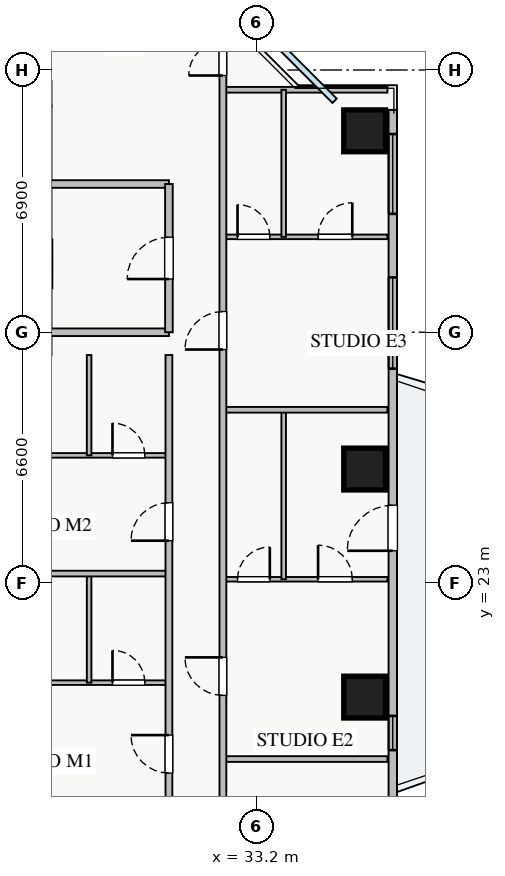
"""IFC4 building model, lengths in metres.
Left out: names, types, materials, properties, quantities, classifications, styles, units other than length and angle.
Written with IfcOpenShell. Run it as: python <this file> out.ifc"""

import sys

from ifc_helpers import new_model, si_unit, direction, frame, frame_2d, origin, origin_2d, place, context, subcontext, project, spatial, rectangle, extrude, source, transform, mapped, element, fill, save


model = new_model("IFC4")
c1 = context("Model", 3, precision=1e-05, world=origin(), true_north=direction((0.0, 1.0)))
c2 = subcontext(c1, "Body", "Model", "MODEL_VIEW")
j1 = project(units=[si_unit("LENGTHUNIT", "METRE"), si_unit("PLANEANGLEUNIT", "RADIAN")], contexts=[c1])
p1 = place(None, origin())
s1 = spatial("IfcSite", under=j1, at=p1, CompositionType="ELEMENT")
p2 = place(p1, origin())
s2 = spatial("IfcBuilding", under=s1, at=p2, CompositionType="ELEMENT")
p3 = place(p2, frame((0.0, 0.0, 110.0)))
s3 = spatial("IfcBuildingStorey", under=s2, at=p3, CompositionType="ELEMENT", Elevation=110.0)
m1 = source(origin(), c2, "Body", "SweptSolid", [
    extrude(rectangle(XDim=1.1, YDim=1.1, at=origin_2d()), origin(), (0.0, 0.0, 1.0), 3.25),
])
for number, where, z_axis, x_axis in (
    (1, (36.05, 20.0, 0.0), (0.0, 0.0, 1.0), (1.0, 0.0, 0.0)),
    (2, (36.05, 26.0, 0.0), (0.0, 0.0, 1.0), (1.0, 0.0, 0.0)),
    (3, (36.05, 34.9, 0.0), (0.0, 0.0, 1.0), (1.0, 0.0, 0.0)),
):
    element("IfcColumn", number, at=place(p3, frame(where, z_axis=z_axis, x_axis=x_axis)), inside=s3, PredefinedType="COLUMN", context=c2, shape_type="MappedRepresentation", body=[
        mapped(m1, transform((0.0, 0.0, 0.0), x_axis=(1.0, 0.0, 0.0), y_axis=(0.0, 1.0, 0.0), z_axis=(0.0, 0.0, 1.0), scale=1.0)),
    ])
p4 = place(p3, frame((36.79, 10.55, 0.0), z_axis=(0.0, 0.0, 1.0), x_axis=(0.0, 1.0, 0.0)))
e4 = element("IfcWall", 4, at=p4, inside=s3, PredefinedType="STANDARD", context=c2, shape_type="SweptSolid", body=[
    extrude(rectangle(XDim=24.9, YDim=0.22, at=frame_2d((12.45, 0.0))), origin(), (0.0, 0.0, 1.0), 2.61),
])
p5 = place(p4, frame((13.3, 0.0, 0.0)))
e5 = element("IfcOpeningElement", 5, at=p5, cuts=e4, PredefinedType="OPENING", context=c2, shape_type="SweptSolid", body=[
    extrude(rectangle(XDim=1.2, YDim=2.1, at=frame_2d((0.6, 1.05))), frame((0.0, 0.12, 0.0), z_axis=(0.0, -1.0, 0.0), x_axis=(1.0, 0.0, 0.0)), (0.0, 0.0, 1.0), 0.24),
])
p6 = place(p4, frame((1.912, 0.0, 0.9)))
e6 = element("IfcOpeningElement", 6, at=p6, cuts=e4, PredefinedType="OPENING", context=c2, shape_type="SweptSolid", body=[
    extrude(rectangle(XDim=2.4, YDim=1.48, at=frame_2d((1.2, 0.74))), frame((0.0, 0.12, 0.0), z_axis=(0.0, -1.0, 0.0), x_axis=(1.0, 0.0, 0.0)), (0.0, 0.0, 1.0), 0.24),
])
p7 = place(p4, frame((22.165, 0.0, 0.9)))
e7 = element("IfcOpeningElement", 7, at=p7, cuts=e4, PredefinedType="OPENING", context=c2, shape_type="SweptSolid", body=[
    extrude(rectangle(XDim=2.1, YDim=1.5, at=frame_2d((1.05, 0.75))), frame((0.0, 0.12, 0.0), z_axis=(0.0, -1.0, 0.0), x_axis=(1.0, 0.0, 0.0)), (0.0, 0.0, 1.0), 0.24),
])
p8 = place(p4, frame((18.093, 0.0, 0.9)))
e8 = element("IfcOpeningElement", 8, at=p8, cuts=e4, PredefinedType="OPENING", context=c2, shape_type="SweptSolid", body=[
    extrude(rectangle(XDim=2.4, YDim=1.5, at=frame_2d((1.2, 0.75))), frame((0.0, 0.12, 0.0), z_axis=(0.0, -1.0, 0.0), x_axis=(1.0, 0.0, 0.0)), (0.0, 0.0, 1.0), 0.24),
])
p9 = place(p4, frame((8.055, 0.0, 0.9)))
e9 = element("IfcOpeningElement", 9, at=p9, cuts=e4, PredefinedType="OPENING", context=c2, shape_type="SweptSolid", body=[
    extrude(rectangle(XDim=0.9, YDim=1.2, at=frame_2d((0.45, 0.6))), frame((0.0, 0.12, 0.0), z_axis=(0.0, -1.0, 0.0), x_axis=(1.0, 0.0, 0.0)), (0.0, 0.0, 1.0), 0.24),
])
for number, where, z_axis, x_axis in (
    (10, (27.8, 29.6, 0.0), (0.0, 0.0, 1.0), (1.0, 0.0, 0.0)),
    (11, (27.8, 33.5, 0.0), (0.0, 0.0, 1.0), (1.0, 0.0, 0.0)),
):
    element("IfcWall", number, at=place(p3, frame(where, z_axis=z_axis, x_axis=x_axis)), inside=s3, PredefinedType="PARTITIONING", context=c2, shape_type="SweptSolid", body=[
        extrude(rectangle(XDim=3.1, YDim=0.2, at=frame_2d((1.55, 0.0))), origin(), (0.0, 0.0, 1.0), 3.07),
    ])
p10 = place(p3, frame((30.9, 29.6, 0.0), z_axis=(0.0, 0.0, 1.0), x_axis=(0.0, 1.0, 0.0)))
e12 = element("IfcWall", 12, at=p10, inside=s3, PredefinedType="PARTITIONING", context=c2, shape_type="SweptSolid", body=[
    extrude(rectangle(XDim=3.9, YDim=0.2, at=frame_2d((1.95, 0.0))), origin(), (0.0, 0.0, 1.0), 3.07),
])
p11 = place(p10, frame((1.4, 0.0, 0.0)))
e13 = element("IfcOpeningElement", 13, at=p11, cuts=e12, PredefinedType="OPENING", context=c2, shape_type="SweptSolid", body=[
    extrude(rectangle(XDim=1.1, YDim=2.05, at=frame_2d((0.55, 1.025))), frame((0.0, 0.11, 0.0), z_axis=(0.0, -1.0, 0.0), x_axis=(1.0, 0.0, 0.0)), (0.0, 0.0, 1.0), 0.22),
])
p12 = place(p3, frame((32.32, 35.98, 0.0), z_axis=(0.0, 0.0, 1.0), x_axis=(1.0, 0.0, 0.0)))
e14 = element("IfcWall", 14, at=p12, inside=s3, PredefinedType="PARTITIONING", context=c2, shape_type="SweptSolid", body=[
    extrude(rectangle(XDim=4.33, YDim=0.15, at=frame_2d((2.165, 0.0))), origin(), (0.0, 0.0, 1.0), 3.07),
])
p13 = place(p3, frame((32.32, 23.1, 0.0), z_axis=(0.0, 0.0, 1.0), x_axis=(1.0, 0.0, 0.0)))
e15 = element("IfcWall", 15, at=p13, inside=s3, PredefinedType="PLUMBINGWALL", context=c2, shape_type="SweptSolid", body=[
    extrude(rectangle(XDim=4.33, YDim=0.12, at=frame_2d((2.165, 0.0))), origin(), (0.0, 0.0, 1.0), 3.07),
])
p14 = place(p13, frame((0.385, 0.0, 0.0)))
e16 = element("IfcOpeningElement", 16, at=p14, cuts=e15, PredefinedType="OPENING", context=c2, shape_type="SweptSolid", body=[
    extrude(rectangle(XDim=0.85, YDim=2.05, at=frame_2d((0.425, 1.025))), frame((0.0, 0.07, 0.0), z_axis=(0.0, -1.0, 0.0), x_axis=(1.0, 0.0, 0.0)), (0.0, 0.0, 1.0), 0.14),
])
p15 = place(p13, frame((2.505, 0.0, 0.0)))
e17 = element("IfcOpeningElement", 17, at=p15, cuts=e15, PredefinedType="OPENING", context=c2, shape_type="SweptSolid", body=[
    extrude(rectangle(XDim=0.9, YDim=2.05, at=frame_2d((0.45, 1.025))), frame((0.0, 0.07, 0.0), z_axis=(0.0, -1.0, 0.0), x_axis=(1.0, 0.0, 0.0)), (0.0, 0.0, 1.0), 0.14),
])
p16 = place(p3, frame((33.92, 23.1, 0.0), z_axis=(0.0, 0.0, 1.0), x_axis=(0.0, 1.0, 0.0)))
e18 = element("IfcWall", 18, at=p16, inside=s3, PredefinedType="PLUMBINGWALL", context=c2, shape_type="SweptSolid", body=[
    extrude(rectangle(XDim=4.46, YDim=0.12, at=frame_2d((2.23, 0.0))), origin(), (0.0, 0.0, 1.0), 3.07),
])
p17 = place(p3, frame((32.32, 18.37, 0.0), z_axis=(0.0, 0.0, 1.0), x_axis=(1.0, 0.0, 0.0)))
e19 = element("IfcWall", 19, at=p17, inside=s3, PredefinedType="PARTITIONING", context=c2, shape_type="SweptSolid", body=[
    extrude(rectangle(XDim=4.33, YDim=0.15, at=frame_2d((2.165, 0.0))), origin(), (0.0, 0.0, 1.0), 2.821),
])
p18 = place(p3, frame((32.32, 32.11, 0.0), z_axis=(0.0, 0.0, 1.0), x_axis=(1.0, 0.0, 0.0)))
e20 = element("IfcWall", 20, at=p18, inside=s3, PredefinedType="PLUMBINGWALL", context=c2, shape_type="SweptSolid", body=[
    extrude(rectangle(XDim=4.33, YDim=0.12, at=frame_2d((2.165, 0.0))), origin(), (0.0, 0.0, 1.0), 3.07),
])
p19 = place(p18, frame((0.385, 0.0, 0.0)))
e21 = element("IfcOpeningElement", 21, at=p19, cuts=e20, PredefinedType="OPENING", context=c2, shape_type="SweptSolid", body=[
    extrude(rectangle(XDim=0.85, YDim=2.05, at=frame_2d((0.425, 1.025))), frame((0.0, 0.07, 0.0), z_axis=(0.0, -1.0, 0.0), x_axis=(1.0, 0.0, 0.0)), (0.0, 0.0, 1.0), 0.14),
])
p20 = place(p18, frame((2.505, 0.0, 0.0)))
e22 = element("IfcOpeningElement", 22, at=p20, cuts=e20, PredefinedType="OPENING", context=c2, shape_type="SweptSolid", body=[
    extrude(rectangle(XDim=0.9, YDim=2.05, at=frame_2d((0.45, 1.025))), frame((0.0, 0.07, 0.0), z_axis=(0.0, -1.0, 0.0), x_axis=(1.0, 0.0, 0.0)), (0.0, 0.0, 1.0), 0.14),
])
p21 = place(p3, frame((33.92, 32.11, 0.0), z_axis=(0.0, 0.0, 1.0), x_axis=(0.0, 1.0, 0.0)))
e23 = element("IfcWall", 23, at=p21, inside=s3, PredefinedType="PLUMBINGWALL", context=c2, shape_type="SweptSolid", body=[
    extrude(rectangle(XDim=3.87, YDim=0.12, at=frame_2d((1.935, 0.0))), origin(), (0.0, 0.0, 1.0), 3.07),
])
p22 = place(p3, frame((32.32, 27.56, 0.0), z_axis=(0.0, 0.0, 1.0), x_axis=(1.0, 0.0, 0.0)))
e24 = element("IfcWall", 24, at=p22, inside=s3, PredefinedType="PARTITIONING", context=c2, shape_type="SweptSolid", body=[
    extrude(rectangle(XDim=4.33, YDim=0.15, at=frame_2d((2.165, 0.0))), origin(), (0.0, 0.0, 1.0), 3.07),
])
p23 = place(p3, frame((32.32, 8.31, 0.0), z_axis=(0.0, 0.0, 1.0), x_axis=(0.0, 1.0, 0.0)))
e25 = element("IfcWall", 25, at=p23, inside=s3, PredefinedType="PARTITIONING", context=c2, shape_type="SweptSolid", body=[
    extrude(rectangle(XDim=29.34, YDim=0.18, at=frame_2d((14.67, 0.0))), origin(), (0.0, 0.0, 1.0), 3.07),
])
p24 = place(p23, frame((28.045, 0.0, 0.0)))
e26 = element("IfcOpeningElement", 26, at=p24, cuts=e25, PredefinedType="OPENING", context=c2, shape_type="SweptSolid", body=[
    extrude(rectangle(XDim=0.9, YDim=2.05, at=frame_2d((0.45, 1.025))), frame((0.0, 0.1, 0.0), z_axis=(0.0, -1.0, 0.0), x_axis=(1.0, 0.0, 0.0)), (0.0, 0.0, 1.0), 0.2),
])
p25 = place(p23, frame((0.415, 0.0, 0.0)))
e27 = element("IfcOpeningElement", 27, at=p25, cuts=e25, PredefinedType="OPENING", context=c2, shape_type="SweptSolid", body=[
    extrude(rectangle(XDim=0.9, YDim=2.05, at=frame_2d((0.45, 1.025))), frame((0.0, 0.1, 0.0), z_axis=(0.0, -1.0, 0.0), x_axis=(1.0, 0.0, 0.0)), (0.0, 0.0, 1.0), 0.2),
])
p26 = place(p23, frame((5.385, 0.0, 0.0)))
e28 = element("IfcOpeningElement", 28, at=p26, cuts=e25, PredefinedType="OPENING", context=c2, shape_type="SweptSolid", body=[
    extrude(rectangle(XDim=1.0, YDim=2.05, at=frame_2d((0.5, 1.025))), frame((0.0, 0.1, 0.0), z_axis=(0.0, -1.0, 0.0), x_axis=(1.0, 0.0, 0.0)), (0.0, 0.0, 1.0), 0.2),
])
p27 = place(p23, frame((11.735, 0.0, 0.0)))
e29 = element("IfcOpeningElement", 29, at=p27, cuts=e25, PredefinedType="OPENING", context=c2, shape_type="SweptSolid", body=[
    extrude(rectangle(XDim=1.0, YDim=2.05, at=frame_2d((0.5, 1.025))), frame((0.0, 0.1, 0.0), z_axis=(0.0, -1.0, 0.0), x_axis=(1.0, 0.0, 0.0)), (0.0, 0.0, 1.0), 0.2),
])
p28 = place(p23, frame((20.835, 0.0, 0.0)))
e30 = element("IfcOpeningElement", 30, at=p28, cuts=e25, PredefinedType="OPENING", context=c2, shape_type="SweptSolid", body=[
    extrude(rectangle(XDim=1.0, YDim=2.05, at=frame_2d((0.5, 1.025))), frame((0.0, 0.1, 0.0), z_axis=(0.0, -1.0, 0.0), x_axis=(1.0, 0.0, 0.0)), (0.0, 0.0, 1.0), 0.2),
])
p29 = place(p3, frame((25.22, 20.38, 0.0), z_axis=(0.0, 0.0, 1.0), x_axis=(1.0, 0.0, 0.0)))
e31 = element("IfcWall", 31, at=p29, inside=s3, PredefinedType="PLUMBINGWALL", context=c2, shape_type="SweptSolid", body=[
    extrude(rectangle(XDim=5.68, YDim=0.12, at=frame_2d((2.84, 0.0))), origin(), (0.0, 0.0, 1.0), 3.07),
])
p30 = place(p29, frame((1.35, 0.0, 0.0)))
e32 = element("IfcOpeningElement", 32, at=p30, cuts=e31, PredefinedType="OPENING", context=c2, shape_type="SweptSolid", body=[
    extrude(rectangle(XDim=0.9, YDim=2.05, at=frame_2d((0.45, 1.025))), frame((0.0, 0.07, 0.0), z_axis=(0.0, -1.0, 0.0), x_axis=(1.0, 0.0, 0.0)), (0.0, 0.0, 1.0), 0.14),
])
p31 = place(p29, frame((4.195, 0.0, 0.0)))
e33 = element("IfcOpeningElement", 33, at=p31, cuts=e31, PredefinedType="OPENING", context=c2, shape_type="SweptSolid", body=[
    extrude(rectangle(XDim=0.85, YDim=2.05, at=frame_2d((0.425, 1.025))), frame((0.0, 0.07, 0.0), z_axis=(0.0, -1.0, 0.0), x_axis=(1.0, 0.0, 0.0)), (0.0, 0.0, 1.0), 0.14),
])
p32 = place(p3, frame((28.8, 20.38, 0.0), z_axis=(0.0, 0.0, 1.0), x_axis=(0.0, 1.0, 0.0)))
e34 = element("IfcWall", 34, at=p32, inside=s3, PredefinedType="PLUMBINGWALL", context=c2, shape_type="SweptSolid", body=[
    extrude(rectangle(XDim=2.87, YDim=0.12, at=frame_2d((1.435, 0.0))), origin(), (0.0, 0.0, 1.0), 3.07),
])
p33 = place(p3, frame((25.22, 26.36, 0.0), z_axis=(0.0, 0.0, 1.0), x_axis=(1.0, 0.0, 0.0)))
e35 = element("IfcWall", 35, at=p33, inside=s3, PredefinedType="PLUMBINGWALL", context=c2, shape_type="SweptSolid", body=[
    extrude(rectangle(XDim=5.68, YDim=0.12, at=frame_2d((2.84, 0.0))), origin(), (0.0, 0.0, 1.0), 3.07),
])
p34 = place(p33, frame((1.35, 0.0, 0.0)))
e36 = element("IfcOpeningElement", 36, at=p34, cuts=e35, PredefinedType="OPENING", context=c2, shape_type="SweptSolid", body=[
    extrude(rectangle(XDim=0.9, YDim=2.05, at=frame_2d((0.45, 1.025))), frame((0.0, 0.07, 0.0), z_axis=(0.0, -1.0, 0.0), x_axis=(1.0, 0.0, 0.0)), (0.0, 0.0, 1.0), 0.14),
])
p35 = place(p33, frame((4.195, 0.0, 0.0)))
e37 = element("IfcOpeningElement", 37, at=p35, cuts=e35, PredefinedType="OPENING", context=c2, shape_type="SweptSolid", body=[
    extrude(rectangle(XDim=0.85, YDim=2.05, at=frame_2d((0.425, 1.025))), frame((0.0, 0.07, 0.0), z_axis=(0.0, -1.0, 0.0), x_axis=(1.0, 0.0, 0.0)), (0.0, 0.0, 1.0), 0.14),
])
p36 = place(p3, frame((28.8, 26.36, 0.0), z_axis=(0.0, 0.0, 1.0), x_axis=(0.0, 1.0, 0.0)))
e38 = element("IfcWall", 38, at=p36, inside=s3, PredefinedType="PLUMBINGWALL", context=c2, shape_type="SweptSolid", body=[
    extrude(rectangle(XDim=2.64, YDim=0.12, at=frame_2d((1.32, 0.0))), origin(), (0.0, 0.0, 1.0), 3.07),
])
p37 = place(p3, frame((25.22, 23.25, 0.0), z_axis=(0.0, 0.0, 1.0), x_axis=(1.0, 0.0, 0.0)))
e39 = element("IfcWall", 39, at=p37, inside=s3, PredefinedType="PARTITIONING", context=c2, shape_type="SweptSolid", body=[
    extrude(rectangle(XDim=5.68, YDim=0.15, at=frame_2d((2.84, 0.0))), origin(), (0.0, 0.0, 1.0), 3.07),
])
p38 = place(p3, frame((30.9, 17.0, 0.0), z_axis=(0.0, 0.0, 1.0), x_axis=(0.0, 1.0, 0.0)))
e40 = element("IfcWall", 40, at=p38, inside=s3, PredefinedType="PARTITIONING", context=c2, shape_type="SweptSolid", body=[
    extrude(rectangle(XDim=12.0, YDim=0.18, at=frame_2d((6.0, 0.0))), origin(), (0.0, 0.0, 1.0), 3.07),
])
p39 = place(p38, frame((1.0, 0.0, 0.0)))
e41 = element("IfcOpeningElement", 41, at=p39, cuts=e40, PredefinedType="OPENING", context=c2, shape_type="SweptSolid", body=[
    extrude(rectangle(XDim=1.0, YDim=2.05, at=frame_2d((0.5, 1.025))), frame((0.0, 0.1, 0.0), z_axis=(0.0, -1.0, 0.0), x_axis=(1.0, 0.0, 0.0)), (0.0, 0.0, 1.0), 0.2),
])
p40 = place(p38, frame((7.115, 0.0, 0.0)))
e42 = element("IfcOpeningElement", 42, at=p40, cuts=e40, PredefinedType="OPENING", context=c2, shape_type="SweptSolid", body=[
    extrude(rectangle(XDim=1.0, YDim=2.05, at=frame_2d((0.5, 1.025))), frame((0.0, 0.1, 0.0), z_axis=(0.0, -1.0, 0.0), x_axis=(1.0, 0.0, 0.0)), (0.0, 0.0, 1.0), 0.2),
])
m2 = source(origin(), c2, "Body", "SweptSolid", [
    extrude(rectangle(XDim=1.2, YDim=2.1, at=frame_2d((0.6, 1.05))), frame((0.0, 0.025, 0.0), z_axis=(0.0, -1.0, 0.0), x_axis=(1.0, 0.0, 0.0)), (0.0, 0.0, 1.0), 0.05),
])
p41 = place(p5, origin())
e43 = element("IfcDoor", 43, at=p41, inside=s3, OperationType="SINGLE_SWING_LEFT", PredefinedType="DOOR", context=c2, shape_type="MappedRepresentation", body=[
    mapped(m2, transform((0.0, 0.0, 0.0), x_axis=(1.0, 0.0, 0.0), y_axis=(0.0, 1.0, 0.0), z_axis=(0.0, 0.0, 1.0), scale=1.0)),
])
fill(e5, e43)
m3 = source(origin(), c2, "Body", "SweptSolid", [
    extrude(rectangle(XDim=2.1, YDim=1.5, at=frame_2d((1.05, 0.75))), frame((0.0, 0.03, 0.0), z_axis=(0.0, -1.0, 0.0), x_axis=(1.0, 0.0, 0.0)), (0.0, 0.0, 1.0), 0.06),
])
p42 = place(p7, origin())
e44 = element("IfcWindow", 44, at=p42, inside=s3, PartitioningType="TRIPLE_PANEL_VERTICAL", PredefinedType="WINDOW", context=c2, shape_type="MappedRepresentation", body=[
    mapped(m3, transform((0.0, 0.0, 0.0), x_axis=(1.0, 0.0, 0.0), y_axis=(0.0, 1.0, 0.0), z_axis=(0.0, 0.0, 1.0), scale=1.0)),
])
fill(e7, e44)
m4 = source(origin(), c2, "Body", "SweptSolid", [
    extrude(rectangle(XDim=1.1, YDim=2.05, at=frame_2d((0.55, 1.025))), frame((0.0, 0.025, 0.0), z_axis=(0.0, -1.0, 0.0), x_axis=(1.0, 0.0, 0.0)), (0.0, 0.0, 1.0), 0.05),
])
p43 = place(p11, origin())
e45 = element("IfcDoor", 45, at=p43, inside=s3, OperationType="SINGLE_SWING_LEFT", PredefinedType="DOOR", context=c2, shape_type="MappedRepresentation", body=[
    mapped(m4, transform((0.0, 0.0, 0.0), x_axis=(1.0, 0.0, 0.0), y_axis=(0.0, 1.0, 0.0), z_axis=(0.0, 0.0, 1.0), scale=1.0)),
])
fill(e13, e45)
m5 = source(origin(), c2, "Body", "SweptSolid", [
    extrude(rectangle(XDim=0.85, YDim=2.05, at=frame_2d((0.425, 1.025))), frame((0.0, 0.025, 0.0), z_axis=(0.0, -1.0, 0.0), x_axis=(1.0, 0.0, 0.0)), (0.0, 0.0, 1.0), 0.05),
])
p44 = place(p14, origin())
e46 = element("IfcDoor", 46, at=p44, inside=s3, OperationType="SINGLE_SWING_RIGHT", PredefinedType="DOOR", context=c2, shape_type="MappedRepresentation", body=[
    mapped(m5, transform((0.0, 0.0, 0.0), x_axis=(1.0, 0.0, 0.0), y_axis=(0.0, 1.0, 0.0), z_axis=(0.0, 0.0, 1.0), scale=1.0)),
])
fill(e16, e46)
m6 = source(origin(), c2, "Body", "SweptSolid", [
    extrude(rectangle(XDim=0.9, YDim=2.05, at=frame_2d((0.45, 1.025))), frame((0.0, 0.025, 0.0), z_axis=(0.0, -1.0, 0.0), x_axis=(1.0, 0.0, 0.0)), (0.0, 0.0, 1.0), 0.05),
])
p45 = place(p15, origin())
e47 = element("IfcDoor", 47, at=p45, inside=s3, OperationType="SINGLE_SWING_LEFT", PredefinedType="DOOR", context=c2, shape_type="MappedRepresentation", body=[
    mapped(m6, transform((0.0, 0.0, 0.0), x_axis=(1.0, 0.0, 0.0), y_axis=(0.0, 1.0, 0.0), z_axis=(0.0, 0.0, 1.0), scale=1.0)),
])
fill(e17, e47)
p46 = place(p19, origin())
e48 = element("IfcDoor", 48, at=p46, inside=s3, OperationType="SINGLE_SWING_LEFT", PredefinedType="DOOR", context=c2, shape_type="MappedRepresentation", body=[
    mapped(m5, transform((0.0, 0.0, 0.0), x_axis=(1.0, 0.0, 0.0), y_axis=(0.0, 1.0, 0.0), z_axis=(0.0, 0.0, 1.0), scale=1.0)),
])
fill(e21, e48)
p47 = place(p20, origin())
e49 = element("IfcDoor", 49, at=p47, inside=s3, OperationType="SINGLE_SWING_RIGHT", PredefinedType="DOOR", context=c2, shape_type="MappedRepresentation", body=[
    mapped(m6, transform((0.0, 0.0, 0.0), x_axis=(1.0, 0.0, 0.0), y_axis=(0.0, 1.0, 0.0), z_axis=(0.0, 0.0, 1.0), scale=1.0)),
])
fill(e22, e49)
p48 = place(p24, origin())
e50 = element("IfcDoor", 50, at=p48, inside=s3, OperationType="SINGLE_SWING_LEFT", PredefinedType="DOOR", context=c2, shape_type="MappedRepresentation", body=[
    mapped(m6, transform((0.0, 0.0, 0.0), x_axis=(1.0, 0.0, 0.0), y_axis=(0.0, 1.0, 0.0), z_axis=(0.0, 0.0, 1.0), scale=1.0)),
])
fill(e26, e50)
m7 = source(origin(), c2, "Body", "SweptSolid", [
    extrude(rectangle(XDim=1.0, YDim=2.05, at=frame_2d((0.5, 1.025))), frame((0.0, 0.025, 0.0), z_axis=(0.0, -1.0, 0.0), x_axis=(1.0, 0.0, 0.0)), (0.0, 0.0, 1.0), 0.05),
])
p49 = place(p27, origin())
e51 = element("IfcDoor", 51, at=p49, inside=s3, OperationType="SINGLE_SWING_RIGHT", PredefinedType="DOOR", context=c2, shape_type="MappedRepresentation", body=[
    mapped(m7, transform((0.0, 0.0, 0.0), x_axis=(1.0, 0.0, 0.0), y_axis=(0.0, 1.0, 0.0), z_axis=(0.0, 0.0, 1.0), scale=1.0)),
])
fill(e29, e51)
p50 = place(p28, origin())
e52 = element("IfcDoor", 52, at=p50, inside=s3, OperationType="SINGLE_SWING_LEFT", PredefinedType="DOOR", context=c2, shape_type="MappedRepresentation", body=[
    mapped(m7, transform((0.0, 0.0, 0.0), x_axis=(1.0, 0.0, 0.0), y_axis=(0.0, 1.0, 0.0), z_axis=(0.0, 0.0, 1.0), scale=1.0)),
])
fill(e30, e52)
p51 = place(p31, origin())
e53 = element("IfcDoor", 53, at=p51, inside=s3, OperationType="SINGLE_SWING_LEFT", PredefinedType="DOOR", context=c2, shape_type="MappedRepresentation", body=[
    mapped(m5, transform((0.0, 0.0, 0.0), x_axis=(1.0, 0.0, 0.0), y_axis=(0.0, 1.0, 0.0), z_axis=(0.0, 0.0, 1.0), scale=1.0)),
])
fill(e33, e53)
p52 = place(p35, origin())
e54 = element("IfcDoor", 54, at=p52, inside=s3, OperationType="SINGLE_SWING_LEFT", PredefinedType="DOOR", context=c2, shape_type="MappedRepresentation", body=[
    mapped(m5, transform((0.0, 0.0, 0.0), x_axis=(1.0, 0.0, 0.0), y_axis=(0.0, 1.0, 0.0), z_axis=(0.0, 0.0, 1.0), scale=1.0)),
])
fill(e37, e54)
p53 = place(p39, origin())
e55 = element("IfcDoor", 55, at=p53, inside=s3, OperationType="SINGLE_SWING_RIGHT", PredefinedType="DOOR", context=c2, shape_type="MappedRepresentation", body=[
    mapped(m7, transform((0.0, 0.0, 0.0), x_axis=(1.0, 0.0, 0.0), y_axis=(0.0, 1.0, 0.0), z_axis=(0.0, 0.0, 1.0), scale=1.0)),
])
fill(e41, e55)
p54 = place(p40, origin())
e56 = element("IfcDoor", 56, at=p54, inside=s3, OperationType="SINGLE_SWING_LEFT", PredefinedType="DOOR", context=c2, shape_type="MappedRepresentation", body=[
    mapped(m7, transform((0.0, 0.0, 0.0), x_axis=(1.0, 0.0, 0.0), y_axis=(0.0, 1.0, 0.0), z_axis=(0.0, 0.0, 1.0), scale=1.0)),
])
fill(e42, e56)
m8 = source(origin(), c2, "Body", "SweptSolid", [
    extrude(rectangle(XDim=2.4, YDim=1.5, at=frame_2d((1.2, 0.75))), frame((0.0, 0.03, 0.0), z_axis=(0.0, -1.0, 0.0), x_axis=(1.0, 0.0, 0.0)), (0.0, 0.0, 1.0), 0.06),
])
p55 = place(p8, origin())
e57 = element("IfcWindow", 57, at=p55, inside=s3, PartitioningType="TRIPLE_PANEL_VERTICAL", PredefinedType="WINDOW", context=c2, shape_type="MappedRepresentation", body=[
    mapped(m8, transform((0.0, 0.0, 0.0), x_axis=(1.0, 0.0, 0.0), y_axis=(0.0, 1.0, 0.0), z_axis=(0.0, 0.0, 1.0), scale=1.0)),
])
fill(e8, e57)
m9 = source(origin(), c2, "Body", "SweptSolid", [
    extrude(rectangle(XDim=0.9, YDim=1.2, at=frame_2d((0.45, 0.6))), frame((0.0, 0.03, 0.0), z_axis=(0.0, -1.0, 0.0), x_axis=(1.0, 0.0, 0.0)), (0.0, 0.0, 1.0), 0.06),
])
p56 = place(p9, origin())
e58 = element("IfcWindow", 58, at=p56, inside=s3, PartitioningType="SINGLE_PANEL", PredefinedType="WINDOW", context=c2, shape_type="MappedRepresentation", body=[
    mapped(m9, transform((0.0, 0.0, 0.0), x_axis=(1.0, 0.0, 0.0), y_axis=(0.0, 1.0, 0.0), z_axis=(0.0, 0.0, 1.0), scale=1.0)),
])
fill(e9, e58)
save(model, sys.argv[1])
